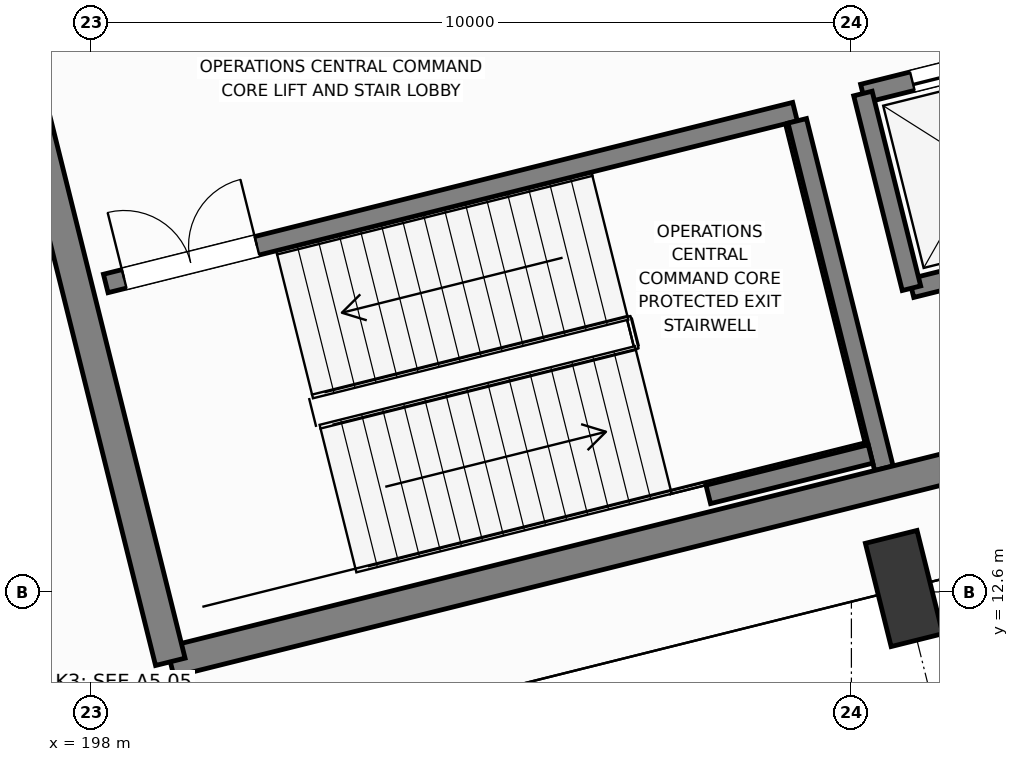
"""IFC4 building model, lengths in metres.
Left out: names, types, materials, properties, quantities, classifications, styles, units other than length and angle.
Written with IfcOpenShell. Run it as: python <this file> out.ifc"""

import sys

from ifc_helpers import new_model, si_unit, direction, frame, frame_2d, origin, origin_2d, place, context, subcontext, project, spatial, rectangle, extrude, element, fill, save


model = new_model("IFC4")
c1 = context("Model", 3, precision=1e-05, world=origin(), true_north=direction((0.0, 1.0)))
c2 = subcontext(c1, "Body", "Model", "MODEL_VIEW")
j1 = project(units=[si_unit("LENGTHUNIT", "METRE"), si_unit("PLANEANGLEUNIT", "RADIAN")], contexts=[c1])
p1 = place(None, origin())
s1 = spatial("IfcSite", under=j1, at=p1, CompositionType="ELEMENT")
p2 = place(p1, origin())
s2 = spatial("IfcBuilding", under=s1, at=p2, CompositionType="ELEMENT")
p3 = place(p2, frame((0.0, 0.0, -5.4)))
s3 = spatial("IfcBuildingStorey", under=s2, at=p3, CompositionType="ELEMENT", Elevation=-5.4)
p4 = place(p3, frame((208.693, 12.645, 0.0), z_axis=(0.0, 0.0, 1.0), x_axis=(0.970295726276, 0.2419218956, 0.0)))
e1 = element("IfcColumn", 1, at=p4, inside=s3, PredefinedType="COLUMN", context=c2, shape_type="SweptSolid", body=[
    extrude(rectangle(XDim=0.7, YDim=1.4, at=origin_2d()), origin(), (0.0, 0.0, 1.0), 5.4),
])
p5 = place(p3, frame((208.79, 16.595, 0.0), z_axis=(0.0, 0.0, 1.0), x_axis=(0.97029284861, 0.241933436994, 0.0)))
e2 = element("IfcWall", 2, at=p5, inside=s3, PredefinedType="SOLIDWALL", context=c2, shape_type="SweptSolid", body=[
    extrude(rectangle(XDim=2.54, YDim=0.25, at=frame_2d((1.27, 0.0))), origin(), (0.0, 0.0, 1.0), 5.02),
])
p6 = place(p3, frame((210.616, 19.771, 0.0), z_axis=(0.0, 0.0, 1.0), x_axis=(-0.97029284861, -0.241933436994, 0.0)))
e3 = element("IfcWall", 3, at=p6, inside=s3, PredefinedType="SOLIDWALL", context=c2, shape_type="SweptSolid", body=[
    extrude(rectangle(XDim=2.54, YDim=0.25, at=frame_2d((1.27, 0.0))), origin(), (0.0, 0.0, 1.0), 5.02),
])
p7 = place(p6, frame((0.67, 0.0, 0.0)))
e4 = element("IfcOpeningElement", 4, at=p7, cuts=e3, PredefinedType="OPENING", context=c2, shape_type="SweptSolid", body=[
    extrude(rectangle(XDim=1.2, YDim=2.2, at=frame_2d((0.6, 1.1))), frame((0.0, 0.135, 0.0), z_axis=(0.0, -1.0, 0.0), x_axis=(1.0, 0.0, 0.0)), (0.0, 0.0, 1.0), 0.27),
])
p8 = place(p3, frame((208.151, 19.157, 0.0), z_axis=(0.0, 0.0, 1.0), x_axis=(0.241938414856, -0.970291607413, 0.0)))
e5 = element("IfcWall", 5, at=p8, inside=s3, PredefinedType="SOLIDWALL", context=c2, shape_type="SweptSolid", body=[
    extrude(rectangle(XDim=2.64, YDim=0.25, at=frame_2d((1.32, 0.0))), origin(), (0.0, 0.0, 1.0), 5.02),
])
p9 = place(p3, frame((198.19, 16.658, 0.0), z_axis=(0.0, 0.0, 1.0), x_axis=(0.970297151331, 0.241916179943, 0.0)))
e6 = element("IfcWall", 6, at=p9, inside=s3, PredefinedType="SOLIDWALL", context=c2, shape_type="SweptSolid", body=[
    extrude(rectangle(XDim=9.345, YDim=0.25, at=frame_2d((4.673, 0.0))), origin(), (0.0, 0.0, 1.0), 5.02),
])
p10 = place(p9, frame((0.25, 0.0, 0.0)))
e7 = element("IfcOpeningElement", 7, at=p10, cuts=e6, PredefinedType="OPENING", context=c2, shape_type="SweptSolid", body=[
    extrude(rectangle(XDim=1.8, YDim=2.25, at=frame_2d((0.9, 1.125))), frame((0.0, 0.135, 0.0), z_axis=(0.0, -1.0, 0.0), x_axis=(1.0, 0.0, 0.0)), (0.0, 0.0, 1.0), 0.27),
])
p11 = place(p3, frame((208.427, 14.227, 0.0), z_axis=(0.0, 0.0, 1.0), x_axis=(-0.241911120435, 0.970298412763, 0.0)))
e8 = element("IfcWall", 8, at=p11, inside=s3, PredefinedType="SOLIDWALL", context=c2, shape_type="SweptSolid", body=[
    extrude(rectangle(XDim=4.71, YDim=0.25, at=frame_2d((2.355, 0.0))), origin(), (0.0, 0.0, 1.0), 5.02),
])
p12 = place(p3, frame((206.117, 13.883, 0.0), z_axis=(0.0, 0.0, 1.0), x_axis=(0.97029738597, 0.241915238833, 0.0)))
e9 = element("IfcWall", 9, at=p12, inside=s3, PredefinedType="SOLIDWALL", context=c2, shape_type="SweptSolid", body=[
    extrude(rectangle(XDim=2.2, YDim=0.25, at=frame_2d((1.1, 0.0))), origin(), (0.0, 0.0, 1.0), 5.02),
])
p13 = place(p3, frame((199.04, 11.681, 0.0), z_axis=(0.0, 0.0, 1.0), x_axis=(0.970295578967, 0.241922486422, 0.0)))
e10 = element("IfcWall", 10, at=p13, inside=s3, PredefinedType="SHEAR", context=c2, shape_type="SweptSolid", body=[
    extrude(rectangle(XDim=14.2, YDim=0.4, at=frame_2d((7.1, 0.0))), origin(), (0.0, 0.0, 1.0), 5.02),
])
p14 = place(p3, frame((196.862, 20.413, 0.0), z_axis=(0.0, 0.0, 1.0), x_axis=(0.241921199913, -0.97029589973, 0.0)))
e11 = element("IfcWall", 11, at=p14, inside=s3, PredefinedType="SHEAR", context=c2, shape_type="SweptSolid", body=[
    extrude(rectangle(XDim=9.0, YDim=0.4, at=frame_2d((4.5, 0.0))), origin(), (0.0, 0.0, 1.0), 5.02),
])
p15 = place(p7, origin())
e12 = element("IfcDoor", 12, at=p15, inside=s3, OperationType="SLIDING_TO_LEFT", PredefinedType="DOOR", context=c2, shape_type="SweptSolid", body=[
    extrude(rectangle(XDim=1.2, YDim=2.2, at=frame_2d((0.6, 1.1))), frame((0.0, 0.025, 0.0), z_axis=(0.0, -1.0, 0.0), x_axis=(1.0, 0.0, 0.0)), (0.0, 0.0, 1.0), 0.05),
])
fill(e4, e12)
p16 = place(p10, origin())
e13 = element("IfcDoor", 13, at=p16, inside=s3, OperationType="DOUBLE_DOOR_SINGLE_SWING", PredefinedType="DOOR", context=c2, shape_type="SweptSolid", body=[
    extrude(rectangle(XDim=1.8, YDim=2.25, at=frame_2d((0.9, 1.125))), frame((0.0, 0.025, 0.0), z_axis=(0.0, -1.0, 0.0), x_axis=(1.0, 0.0, 0.0)), (0.0, 0.0, 1.0), 0.05),
])
fill(e7, e13)
save(model, sys.argv[1])
